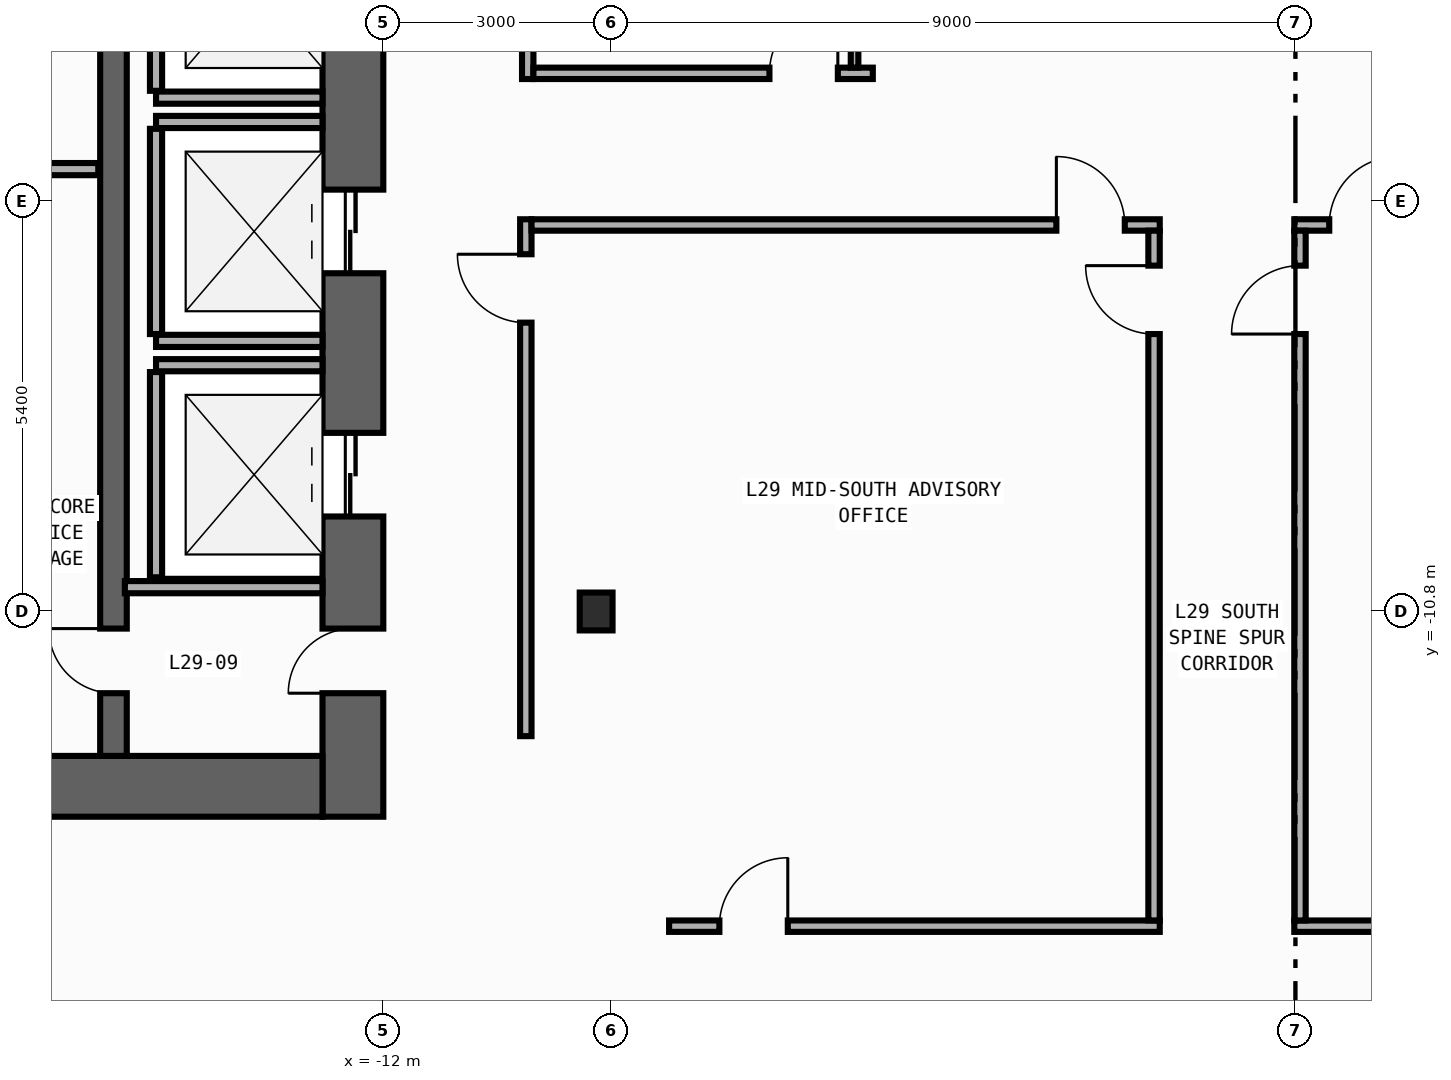
"""IFC4 building model, lengths in metres.
Left out: names, types, materials, properties, quantities, classifications, styles, units other than length and angle.
Written with IfcOpenShell. Run it as: python <this file> out.ifc"""

import sys

from ifc_helpers import new_model, si_unit, direction, frame, frame_2d, origin, origin_2d, place, context, subcontext, project, spatial, rectangle, i_section, extrude, element, fill, save


model = new_model("IFC4")
c1 = context("Model", 3, precision=1e-05, world=origin(), true_north=direction((0.0, 1.0)))
c2 = subcontext(c1, "Body", "Model", "MODEL_VIEW")
j1 = project(units=[si_unit("LENGTHUNIT", "METRE"), si_unit("PLANEANGLEUNIT", "RADIAN")], contexts=[c1])
p1 = place(None, origin())
s1 = spatial("IfcSite", under=j1, at=p1, CompositionType="ELEMENT")
p2 = place(p1, origin())
s2 = spatial("IfcBuilding", under=s1, at=p2, CompositionType="ELEMENT")
p3 = place(p2, frame((0.0, 0.0, 126.8)))
s3 = spatial("IfcBuildingStorey", under=s2, at=p3, CompositionType="ELEMENT", Elevation=126.8)
p4 = place(p3, frame((-12.4, -13.5, 0.0), z_axis=(0.0, 0.0, 1.0), x_axis=(0.0, 1.0, 0.0)))
e1 = element("IfcWall", 1, at=p4, inside=s3, PredefinedType="SHEAR", context=c2, shape_type="SweptSolid", body=[
    extrude(rectangle(XDim=27.0, YDim=0.8, at=frame_2d((13.5, 0.0))), origin(), (0.0, 0.0, 1.0), 3.94),
])
p5 = place(p4, frame((10.35, 0.0, 0.0)))
e2 = element("IfcOpeningElement", 2, at=p5, cuts=e1, PredefinedType="OPENING", context=c2, shape_type="SweptSolid", body=[
    extrude(rectangle(XDim=1.1, YDim=2.2, at=frame_2d((0.55, 1.1))), frame((0.0, 0.41, 0.0), z_axis=(0.0, -1.0, 0.0), x_axis=(1.0, 0.0, 0.0)), (0.0, 0.0, 1.0), 0.82),
])
p6 = place(p4, frame((7.15, 0.0, 0.0)))
e3 = element("IfcOpeningElement", 3, at=p6, cuts=e1, PredefinedType="OPENING", context=c2, shape_type="SweptSolid", body=[
    extrude(rectangle(XDim=1.1, YDim=2.2, at=frame_2d((0.55, 1.1))), frame((0.0, 0.41, 0.0), z_axis=(0.0, -1.0, 0.0), x_axis=(1.0, 0.0, 0.0)), (0.0, 0.0, 1.0), 0.82),
])
p7 = place(p4, frame((3.95, 0.0, 0.0)))
e4 = element("IfcOpeningElement", 4, at=p7, cuts=e1, PredefinedType="OPENING", context=c2, shape_type="SweptSolid", body=[
    extrude(rectangle(XDim=1.1, YDim=2.2, at=frame_2d((0.55, 1.1))), frame((0.0, 0.41, 0.0), z_axis=(0.0, -1.0, 0.0), x_axis=(1.0, 0.0, 0.0)), (0.0, 0.0, 1.0), 0.82),
])
p8 = place(p4, frame((15.175, 0.0, 0.0)))
e5 = element("IfcOpeningElement", 5, at=p8, cuts=e1, PredefinedType="OPENING", context=c2, shape_type="SweptSolid", body=[
    extrude(rectangle(XDim=0.85, YDim=2.1, at=frame_2d((0.425, 1.05))), frame((0.0, 0.41, 0.0), z_axis=(0.0, -1.0, 0.0), x_axis=(1.0, 0.0, 0.0)), (0.0, 0.0, 1.0), 0.82),
])
p9 = place(p4, frame((21.275, 0.0, 0.0)))
e6 = element("IfcOpeningElement", 6, at=p9, cuts=e1, PredefinedType="OPENING", context=c2, shape_type="SweptSolid", body=[
    extrude(rectangle(XDim=0.85, YDim=2.1, at=frame_2d((0.425, 1.05))), frame((0.0, 0.41, 0.0), z_axis=(0.0, -1.0, 0.0), x_axis=(1.0, 0.0, 0.0)), (0.0, 0.0, 1.0), 0.82),
])
p10 = place(p4, frame((12.725, 0.0, 0.0)))
e7 = element("IfcOpeningElement", 7, at=p10, cuts=e1, PredefinedType="OPENING", context=c2, shape_type="SweptSolid", body=[
    extrude(rectangle(XDim=1.15, YDim=2.2, at=frame_2d((0.575, 1.1))), frame((0.0, 0.41, 0.0), z_axis=(0.0, -1.0, 0.0), x_axis=(1.0, 0.0, 0.0)), (0.0, 0.0, 1.0), 0.82),
])
p11 = place(p4, frame((1.625, 0.0, 0.0)))
e8 = element("IfcOpeningElement", 8, at=p11, cuts=e1, PredefinedType="OPENING", context=c2, shape_type="SweptSolid", body=[
    extrude(rectangle(XDim=0.85, YDim=2.1, at=frame_2d((0.425, 1.05))), frame((0.0, 0.41, 0.0), z_axis=(0.0, -1.0, 0.0), x_axis=(1.0, 0.0, 0.0)), (0.0, 0.0, 1.0), 0.82),
])
p12 = place(p3, frame((-19.6, -13.1, 0.0), z_axis=(0.0, 0.0, 1.0), x_axis=(1.0, 0.0, 0.0)))
e9 = element("IfcWall", 9, at=p12, inside=s3, PredefinedType="SHEAR", context=c2, shape_type="SweptSolid", body=[
    extrude(rectangle(XDim=6.8, YDim=0.8, at=frame_2d((3.4, 0.0))), origin(), (0.0, 0.0, 1.0), 3.94),
])
p13 = place(p3, frame((-15.55, -12.7, 0.0), z_axis=(0.0, 0.0, 1.0), x_axis=(0.0, 1.0, 0.0)))
e10 = element("IfcWall", 10, at=p13, inside=s3, PredefinedType="SHEAR", context=c2, shape_type="SweptSolid", body=[
    extrude(rectangle(XDim=25.4, YDim=0.35, at=frame_2d((12.7, 0.0))), origin(), (0.0, 0.0, 1.0), 3.94),
])
p14 = place(p13, frame((11.925, 0.0, 0.0)))
e11 = element("IfcOpeningElement", 11, at=p14, cuts=e10, PredefinedType="OPENING", context=c2, shape_type="SweptSolid", body=[
    extrude(rectangle(XDim=1.15, YDim=2.2, at=frame_2d((0.575, 1.1))), frame((0.0, 0.185, 0.0), z_axis=(0.0, -1.0, 0.0), x_axis=(1.0, 0.0, 0.0)), (0.0, 0.0, 1.0), 0.37),
])
p15 = place(p13, frame((0.825, 0.0, 0.0)))
e12 = element("IfcOpeningElement", 12, at=p15, cuts=e10, PredefinedType="OPENING", context=c2, shape_type="SweptSolid", body=[
    extrude(rectangle(XDim=0.85, YDim=2.1, at=frame_2d((0.425, 1.05))), frame((0.0, 0.185, 0.0), z_axis=(0.0, -1.0, 0.0), x_axis=(1.0, 0.0, 0.0)), (0.0, 0.0, 1.0), 0.37),
])
p16 = place(p3, frame((-9.2, -10.8, 0.0), z_axis=(0.0, 0.0, 1.0), x_axis=(1.0, 0.0, 0.0)))
e13 = element("IfcColumn", 13, at=p16, inside=s3, PredefinedType="COLUMN", context=c2, shape_type="SweptSolid", body=[
    extrude(i_section(OverallWidth=0.432, OverallDepth=0.498, WebThickness=0.045, FlangeThickness=0.07, FilletRadius=0.022, at=origin_2d()), origin(), (0.0, 0.0, 1.0), 4.2),
])
p17 = place(p3, frame((-14.99, -4.04, 0.0), z_axis=(0.0, 0.0, 1.0), x_axis=(1.0, 0.0, 0.0)))
e14 = element("IfcWall", 14, at=p17, inside=s3, PredefinedType="STANDARD", context=c2, shape_type="SweptSolid", body=[
    extrude(rectangle(XDim=2.19, YDim=0.16, at=frame_2d((1.095, 0.0))), origin(), (0.0, 0.0, 1.0), 3.94),
])
p18 = place(p3, frame((-14.99, -3.95, 0.0), z_axis=(0.0, 0.0, 1.0), x_axis=(0.0, 1.0, 0.0)))
e15 = element("IfcWall", 15, at=p18, inside=s3, PredefinedType="STANDARD", context=c2, shape_type="SweptSolid", body=[
    extrude(rectangle(XDim=2.7, YDim=0.16, at=frame_2d((1.35, 0.0))), origin(), (0.0, 0.0, 1.0), 3.94),
])
for number, where, z_axis, x_axis in (
    (16, (-14.99, -7.24, 0.0), (0.0, 0.0, 1.0), (1.0, 0.0, 0.0)),
    (17, (-14.99, -4.36, 0.0), (0.0, 0.0, 1.0), (1.0, 0.0, 0.0)),
):
    element("IfcWall", number, at=place(p3, frame(where, z_axis=z_axis, x_axis=x_axis)), inside=s3, PredefinedType="STANDARD", context=c2, shape_type="SweptSolid", body=[
        extrude(rectangle(XDim=2.19, YDim=0.16, at=frame_2d((1.095, 0.0))), origin(), (0.0, 0.0, 1.0), 3.94),
    ])
p19 = place(p3, frame((-14.99, -7.15, 0.0), z_axis=(0.0, 0.0, 1.0), x_axis=(0.0, 1.0, 0.0)))
e18 = element("IfcWall", 18, at=p19, inside=s3, PredefinedType="STANDARD", context=c2, shape_type="SweptSolid", body=[
    extrude(rectangle(XDim=2.7, YDim=0.16, at=frame_2d((1.35, 0.0))), origin(), (0.0, 0.0, 1.0), 3.94),
])
p20 = place(p3, frame((-14.99, -7.56, 0.0), z_axis=(0.0, 0.0, 1.0), x_axis=(1.0, 0.0, 0.0)))
e19 = element("IfcWall", 19, at=p20, inside=s3, PredefinedType="STANDARD", context=c2, shape_type="SweptSolid", body=[
    extrude(rectangle(XDim=2.19, YDim=0.16, at=frame_2d((1.095, 0.0))), origin(), (0.0, 0.0, 1.0), 3.94),
])
p21 = place(p3, frame((-14.99, -10.35, 0.0), z_axis=(0.0, 0.0, 1.0), x_axis=(0.0, 1.0, 0.0)))
e20 = element("IfcWall", 20, at=p21, inside=s3, PredefinedType="STANDARD", context=c2, shape_type="SweptSolid", body=[
    extrude(rectangle(XDim=2.7, YDim=0.16, at=frame_2d((1.35, 0.0))), origin(), (0.0, 0.0, 1.0), 3.94),
])
p22 = place(p3, frame((-19.55, -4.98, 0.0), z_axis=(0.0, 0.0, 1.0), x_axis=(1.0, 0.0, 0.0)))
e21 = element("IfcWall", 21, at=p22, inside=s3, PredefinedType="STANDARD", context=c2, shape_type="SweptSolid", body=[
    extrude(rectangle(XDim=3.8, YDim=0.16, at=frame_2d((1.9, 0.0))), origin(), (0.0, 0.0, 1.0), 3.94),
])
p23 = place(p3, frame((-15.4, -10.48, 0.0), z_axis=(0.0, 0.0, 1.0), x_axis=(1.0, 0.0, 0.0)))
e22 = element("IfcWall", 22, at=p23, inside=s3, PredefinedType="STANDARD", context=c2, shape_type="SweptSolid", body=[
    extrude(rectangle(XDim=2.6, YDim=0.16, at=frame_2d((1.3, 0.0))), origin(), (0.0, 0.0, 1.0), 3.94),
])
p24 = place(p3, frame((-10.1, -3.795, 0.0), z_axis=(0.0, 0.0, 1.0), x_axis=(0.0, 1.0, 0.0)))
e23 = element("IfcWall", 23, at=p24, inside=s3, PredefinedType="PARTITIONING", context=c2, shape_type="SweptSolid", body=[
    extrude(rectangle(XDim=4.275, YDim=0.15, at=frame_2d((2.137, 0.0))), origin(), (0.0, 0.0, 1.0), 3.94),
])
p25 = place(p24, frame((0.46, 0.0, 0.0)))
e24 = element("IfcOpeningElement", 24, at=p25, cuts=e23, PredefinedType="OPENING", context=c2, shape_type="SweptSolid", body=[
    extrude(rectangle(XDim=0.9, YDim=2.15, at=frame_2d((0.45, 1.075))), frame((0.0, 0.085, 0.0), z_axis=(0.0, -1.0, 0.0), x_axis=(1.0, 0.0, 0.0)), (0.0, 0.0, 1.0), 0.17),
])
p26 = place(p3, frame((-10.125, -12.44, 0.0), z_axis=(0.0, 0.0, 1.0), x_axis=(0.0, 1.0, 0.0)))
e25 = element("IfcWall", 25, at=p26, inside=s3, PredefinedType="PARTITIONING", context=c2, shape_type="SweptSolid", body=[
    extrude(rectangle(XDim=6.8, YDim=0.15, at=frame_2d((3.4, 0.0))), origin(), (0.0, 0.0, 1.0), 3.94),
])
p27 = place(p26, frame((5.44, 0.0, 0.0)))
e26 = element("IfcOpeningElement", 26, at=p27, cuts=e25, PredefinedType="OPENING", context=c2, shape_type="SweptSolid", body=[
    extrude(rectangle(XDim=0.9, YDim=2.15, at=frame_2d((0.45, 1.075))), frame((0.0, 0.085, 0.0), z_axis=(0.0, -1.0, 0.0), x_axis=(1.0, 0.0, 0.0)), (0.0, 0.0, 1.0), 0.17),
])
p28 = place(p3, frame((-10.025, -3.72, 0.0), z_axis=(0.0, 0.0, 1.0), x_axis=(1.0, 0.0, 0.0)))
e27 = element("IfcWall", 27, at=p28, inside=s3, PredefinedType="PARTITIONING", context=c2, shape_type="SweptSolid", body=[
    extrude(rectangle(XDim=4.465, YDim=0.15, at=frame_2d((2.232, 0.0))), origin(), (0.0, 0.0, 1.0), 3.94),
])
p29 = place(p28, frame((3.105, 0.0, 0.0)))
e28 = element("IfcOpeningElement", 28, at=p29, cuts=e27, PredefinedType="OPENING", context=c2, shape_type="SweptSolid", body=[
    extrude(rectangle(XDim=0.9, YDim=2.15, at=frame_2d((0.45, 1.075))), frame((0.0, 0.085, 0.0), z_axis=(0.0, -1.0, 0.0), x_axis=(1.0, 0.0, 0.0)), (0.0, 0.0, 1.0), 0.17),
])
p30 = place(p3, frame((-10.05, -5.715, 0.0), z_axis=(0.0, 0.0, 1.0), x_axis=(1.0, 0.0, 0.0)))
e29 = element("IfcWall", 29, at=p30, inside=s3, PredefinedType="PARTITIONING", context=c2, shape_type="SweptSolid", body=[
    extrude(rectangle(XDim=8.265, YDim=0.15, at=frame_2d((4.133, 0.0))), origin(), (0.0, 0.0, 1.0), 3.94),
])
p31 = place(p30, frame((6.905, 0.0, 0.0)))
e30 = element("IfcOpeningElement", 30, at=p31, cuts=e29, PredefinedType="OPENING", context=c2, shape_type="SweptSolid", body=[
    extrude(rectangle(XDim=0.9, YDim=2.15, at=frame_2d((0.45, 1.075))), frame((0.0, 0.085, 0.0), z_axis=(0.0, -1.0, 0.0), x_axis=(1.0, 0.0, 0.0)), (0.0, 0.0, 1.0), 0.17),
])
p32 = place(p3, frame((-0.015, -5.715, 0.0), z_axis=(0.0, 0.0, 1.0), x_axis=(1.0, 0.0, 0.0)))
e31 = element("IfcWall", 31, at=p32, inside=s3, PredefinedType="PARTITIONING", context=c2, shape_type="SweptSolid", body=[
    extrude(rectangle(XDim=10.065, YDim=0.15, at=frame_2d((5.032, 0.0))), origin(), (0.0, 0.0, 1.0), 3.94),
])
p33 = place(p32, frame((0.46, 0.0, 0.0)))
e32 = element("IfcOpeningElement", 32, at=p33, cuts=e31, PredefinedType="OPENING", context=c2, shape_type="SweptSolid", body=[
    extrude(rectangle(XDim=0.9, YDim=2.15, at=frame_2d((0.45, 1.075))), frame((0.0, 0.085, 0.0), z_axis=(0.0, -1.0, 0.0), x_axis=(1.0, 0.0, 0.0)), (0.0, 0.0, 1.0), 0.17),
])
p34 = place(p3, frame((-8.24, -14.94, 0.0), z_axis=(0.0, 0.0, 1.0), x_axis=(1.0, 0.0, 0.0)))
e33 = element("IfcWall", 33, at=p34, inside=s3, PredefinedType="PARTITIONING", context=c2, shape_type="SweptSolid", body=[
    extrude(rectangle(XDim=6.455, YDim=0.15, at=frame_2d((3.228, 0.0))), origin(), (0.0, 0.0, 1.0), 3.94),
])
p35 = place(p34, frame((0.662, 0.0, 0.0)))
e34 = element("IfcOpeningElement", 34, at=p35, cuts=e33, PredefinedType="OPENING", context=c2, shape_type="SweptSolid", body=[
    extrude(rectangle(XDim=0.9, YDim=2.15, at=frame_2d((0.45, 1.075))), frame((0.0, 0.085, 0.0), z_axis=(0.0, -1.0, 0.0), x_axis=(1.0, 0.0, 0.0)), (0.0, 0.0, 1.0), 0.17),
])
p36 = place(p3, frame((-0.015, -14.94, 0.0), z_axis=(0.0, 0.0, 1.0), x_axis=(1.0, 0.0, 0.0)))
e35 = element("IfcWall", 35, at=p36, inside=s3, PredefinedType="PARTITIONING", context=c2, shape_type="SweptSolid", body=[
    extrude(rectangle(XDim=8.255, YDim=0.15, at=frame_2d((4.127, 0.0))), origin(), (0.0, 0.0, 1.0), 3.94),
])
p37 = place(p36, frame((6.694, 0.0, 0.0)))
e36 = element("IfcOpeningElement", 36, at=p37, cuts=e35, PredefinedType="OPENING", context=c2, shape_type="SweptSolid", body=[
    extrude(rectangle(XDim=0.9, YDim=2.15, at=frame_2d((0.45, 1.075))), frame((0.0, 0.085, 0.0), z_axis=(0.0, -1.0, 0.0), x_axis=(1.0, 0.0, 0.0)), (0.0, 0.0, 1.0), 0.17),
])
p38 = place(p3, frame((-1.86, -14.865, 0.0), z_axis=(0.0, 0.0, 1.0), x_axis=(0.0, 1.0, 0.0)))
e37 = element("IfcWall", 37, at=p38, inside=s3, PredefinedType="PARTITIONING", context=c2, shape_type="SweptSolid", body=[
    extrude(rectangle(XDim=9.075, YDim=0.15, at=frame_2d((4.538, 0.0))), origin(), (0.0, 0.0, 1.0), 3.94),
])
p39 = place(p38, frame((7.715, 0.0, 0.0)))
e38 = element("IfcOpeningElement", 38, at=p39, cuts=e37, PredefinedType="OPENING", context=c2, shape_type="SweptSolid", body=[
    extrude(rectangle(XDim=0.9, YDim=2.15, at=frame_2d((0.45, 1.075))), frame((0.0, 0.085, 0.0), z_axis=(0.0, -1.0, 0.0), x_axis=(1.0, 0.0, 0.0)), (0.0, 0.0, 1.0), 0.17),
])
p40 = place(p3, frame((0.06, -14.865, 0.0), z_axis=(0.0, 0.0, 1.0), x_axis=(0.0, 1.0, 0.0)))
e39 = element("IfcWall", 39, at=p40, inside=s3, PredefinedType="PARTITIONING", context=c2, shape_type="SweptSolid", body=[
    extrude(rectangle(XDim=9.075, YDim=0.15, at=frame_2d((4.538, 0.0))), origin(), (0.0, 0.0, 1.0), 3.94),
])
p41 = place(p40, frame((7.715, 0.0, 0.0)))
e40 = element("IfcOpeningElement", 40, at=p41, cuts=e39, PredefinedType="OPENING", context=c2, shape_type="SweptSolid", body=[
    extrude(rectangle(XDim=0.9, YDim=2.15, at=frame_2d((0.45, 1.075))), frame((0.0, 0.085, 0.0), z_axis=(0.0, -1.0, 0.0), x_axis=(1.0, 0.0, 0.0)), (0.0, 0.0, 1.0), 0.17),
])
p42 = place(p3, frame((-5.8, 0.41, 0.0), z_axis=(0.0, 0.0, 1.0), x_axis=(0.0, -1.0, 0.0)))
e41 = element("IfcWall", 41, at=p42, inside=s3, PredefinedType="PARTITIONING", context=c2, shape_type="SweptSolid", body=[
    extrude(rectangle(XDim=4.055, YDim=0.1, at=frame_2d((2.027, 0.0))), origin(), (0.0, 0.0, 1.0), 3.94),
])
p43 = place(p6, origin())
e42 = element("IfcDoor", 42, at=p43, inside=s3, OperationType="DOUBLE_DOOR_SLIDING", PredefinedType="DOOR", context=c2, shape_type="SweptSolid", body=[
    extrude(rectangle(XDim=1.1, YDim=2.2, at=frame_2d((0.55, 1.1))), frame((0.0, 0.025, 0.0), z_axis=(0.0, -1.0, 0.0), x_axis=(1.0, 0.0, 0.0)), (0.0, 0.0, 1.0), 0.05),
])
fill(e3, e42)
p44 = place(p7, origin())
e43 = element("IfcDoor", 43, at=p44, inside=s3, OperationType="DOUBLE_DOOR_SLIDING", PredefinedType="DOOR", context=c2, shape_type="SweptSolid", body=[
    extrude(rectangle(XDim=1.1, YDim=2.2, at=frame_2d((0.55, 1.1))), frame((0.0, 0.025, 0.0), z_axis=(0.0, -1.0, 0.0), x_axis=(1.0, 0.0, 0.0)), (0.0, 0.0, 1.0), 0.05),
])
fill(e4, e43)
p45 = place(p11, origin())
e44 = element("IfcDoor", 44, at=p45, inside=s3, OperationType="SINGLE_SWING_LEFT", PredefinedType="DOOR", context=c2, shape_type="SweptSolid", body=[
    extrude(rectangle(XDim=0.85, YDim=2.1, at=frame_2d((0.425, 1.05))), frame((0.0, 0.025, 0.0), z_axis=(0.0, -1.0, 0.0), x_axis=(1.0, 0.0, 0.0)), (0.0, 0.0, 1.0), 0.05),
])
fill(e8, e44)
p46 = place(p15, origin())
e45 = element("IfcDoor", 45, at=p46, inside=s3, OperationType="SINGLE_SWING_RIGHT", PredefinedType="DOOR", context=c2, shape_type="SweptSolid", body=[
    extrude(rectangle(XDim=0.85, YDim=2.1, at=frame_2d((0.425, 1.05))), frame((0.0, 0.025, 0.0), z_axis=(0.0, -1.0, 0.0), x_axis=(1.0, 0.0, 0.0)), (0.0, 0.0, 1.0), 0.05),
])
fill(e12, e45)
p47 = place(p27, origin())
e46 = element("IfcDoor", 46, at=p47, inside=s3, OperationType="SINGLE_SWING_RIGHT", PredefinedType="DOOR", context=c2, shape_type="SweptSolid", body=[
    extrude(rectangle(XDim=0.9, YDim=2.15, at=frame_2d((0.45, 1.075))), frame((0.0, 0.025, 0.0), z_axis=(0.0, -1.0, 0.0), x_axis=(1.0, 0.0, 0.0)), (0.0, 0.0, 1.0), 0.05),
])
fill(e26, e46)
p48 = place(p29, origin())
e47 = element("IfcDoor", 47, at=p48, inside=s3, OperationType="SINGLE_SWING_RIGHT", PredefinedType="DOOR", context=c2, shape_type="SweptSolid", body=[
    extrude(rectangle(XDim=0.9, YDim=2.15, at=frame_2d((0.45, 1.075))), frame((0.0, 0.025, 0.0), z_axis=(0.0, -1.0, 0.0), x_axis=(1.0, 0.0, 0.0)), (0.0, 0.0, 1.0), 0.05),
])
fill(e28, e47)
p49 = place(p31, origin())
e48 = element("IfcDoor", 48, at=p49, inside=s3, OperationType="SINGLE_SWING_LEFT", PredefinedType="DOOR", context=c2, shape_type="SweptSolid", body=[
    extrude(rectangle(XDim=0.9, YDim=2.15, at=frame_2d((0.45, 1.075))), frame((0.0, 0.025, 0.0), z_axis=(0.0, -1.0, 0.0), x_axis=(1.0, 0.0, 0.0)), (0.0, 0.0, 1.0), 0.05),
])
fill(e30, e48)
p50 = place(p33, origin())
e49 = element("IfcDoor", 49, at=p50, inside=s3, OperationType="SINGLE_SWING_RIGHT", PredefinedType="DOOR", context=c2, shape_type="SweptSolid", body=[
    extrude(rectangle(XDim=0.9, YDim=2.15, at=frame_2d((0.45, 1.075))), frame((0.0, 0.025, 0.0), z_axis=(0.0, -1.0, 0.0), x_axis=(1.0, 0.0, 0.0)), (0.0, 0.0, 1.0), 0.05),
])
fill(e32, e49)
p51 = place(p35, origin())
e50 = element("IfcDoor", 50, at=p51, inside=s3, OperationType="SINGLE_SWING_RIGHT", PredefinedType="DOOR", context=c2, shape_type="SweptSolid", body=[
    extrude(rectangle(XDim=0.9, YDim=2.15, at=frame_2d((0.45, 1.075))), frame((0.0, 0.025, 0.0), z_axis=(0.0, -1.0, 0.0), x_axis=(1.0, 0.0, 0.0)), (0.0, 0.0, 1.0), 0.05),
])
fill(e34, e50)
p52 = place(p39, origin())
e51 = element("IfcDoor", 51, at=p52, inside=s3, OperationType="SINGLE_SWING_RIGHT", PredefinedType="DOOR", context=c2, shape_type="SweptSolid", body=[
    extrude(rectangle(XDim=0.9, YDim=2.15, at=frame_2d((0.45, 1.075))), frame((0.0, 0.025, 0.0), z_axis=(0.0, -1.0, 0.0), x_axis=(1.0, 0.0, 0.0)), (0.0, 0.0, 1.0), 0.05),
])
fill(e38, e51)
p53 = place(p41, origin())
e52 = element("IfcDoor", 52, at=p53, inside=s3, OperationType="SINGLE_SWING_LEFT", PredefinedType="DOOR", context=c2, shape_type="SweptSolid", body=[
    extrude(rectangle(XDim=0.9, YDim=2.15, at=frame_2d((0.45, 1.075))), frame((0.0, 0.025, 0.0), z_axis=(0.0, -1.0, 0.0), x_axis=(1.0, 0.0, 0.0)), (0.0, 0.0, 1.0), 0.05),
])
fill(e40, e52)
save(model, sys.argv[1])
